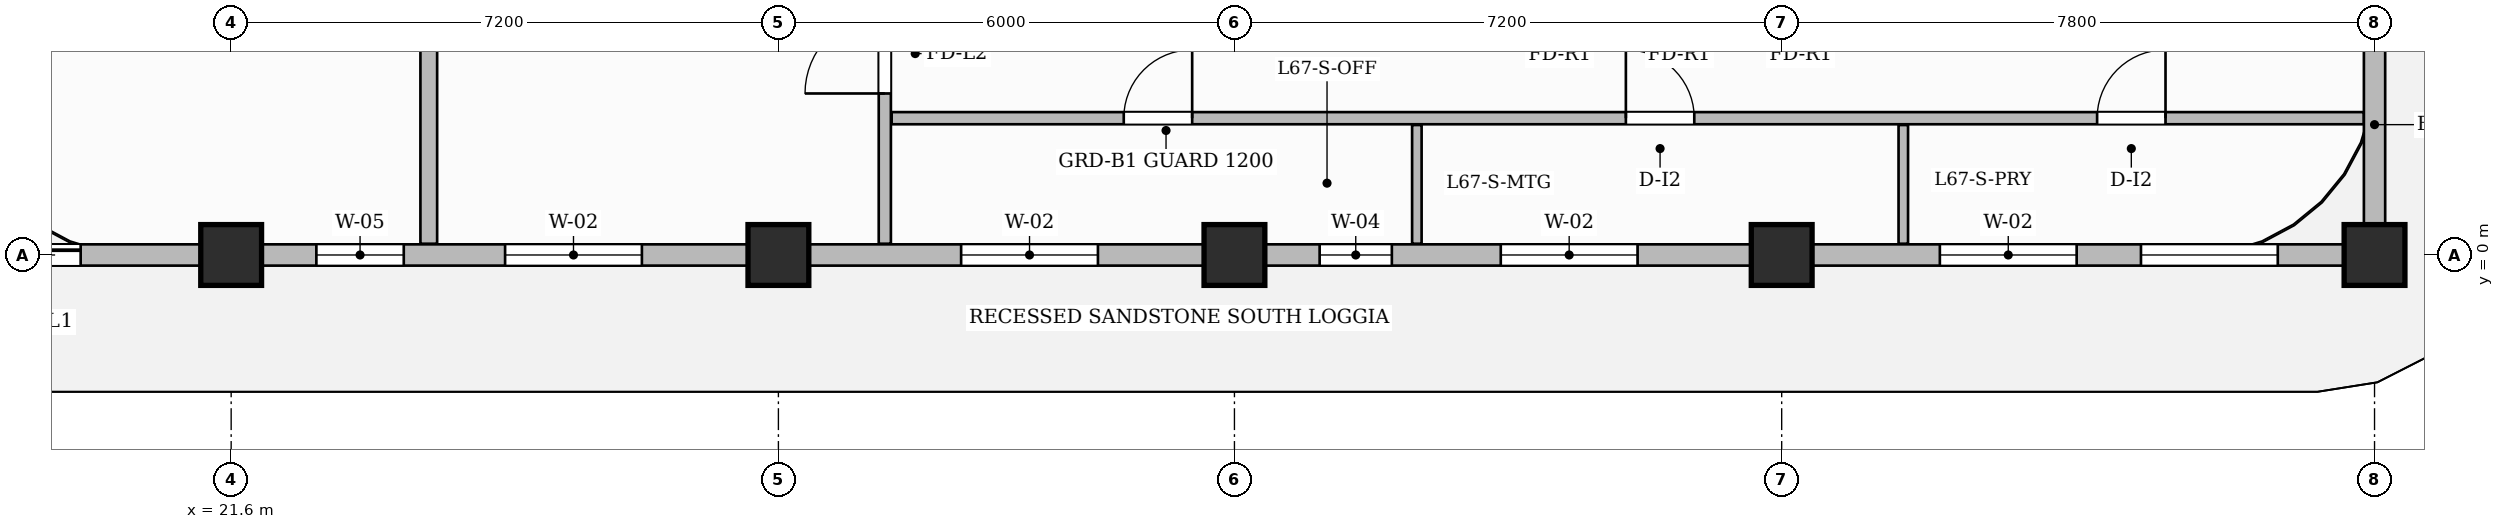
"""IFC4 building model, lengths in metres.
Left out: names, types, materials, properties, quantities, classifications, styles, units other than length and angle.
Written with IfcOpenShell. Run it as: python <this file> out.ifc"""

import sys

from ifc_helpers import new_model, si_unit, direction, frame, frame_2d, origin, origin_2d, place, context, subcontext, project, spatial, rectangle, extrude, source, transform, mapped, element, fill, save


model = new_model("IFC4")
c1 = context("Model", 3, precision=1e-05, world=origin(), true_north=direction((0.0, 1.0)))
c2 = subcontext(c1, "Body", "Model", "MODEL_VIEW")
j1 = project(units=[si_unit("LENGTHUNIT", "METRE"), si_unit("PLANEANGLEUNIT", "RADIAN")], contexts=[c1])
p1 = place(None, origin())
s1 = spatial("IfcSite", under=j1, at=p1, CompositionType="ELEMENT")
p2 = place(p1, origin())
s2 = spatial("IfcBuilding", under=s1, at=p2, CompositionType="ELEMENT")
p3 = place(p2, frame((0.0, 0.0, 267.35)))
s3 = spatial("IfcBuildingStorey", under=s2, at=p3, CompositionType="ELEMENT", Elevation=267.35)
m1 = source(origin(), c2, "Body", "SweptSolid", [
    extrude(rectangle(XDim=0.8, YDim=0.8, at=origin_2d()), origin(), (0.0, 0.0, 1.0), 3.85),
])
for number, where, z_axis, x_axis in (
    (1, (21.6, 0.0, 0.0), (0.0, 0.0, 1.0), (1.0, 0.0, 0.0)),
    (2, (28.8, 0.0, 0.0), (0.0, 0.0, 1.0), (1.0, 0.0, 0.0)),
    (3, (34.8, 0.0, 0.0), (0.0, 0.0, 1.0), (1.0, 0.0, 0.0)),
    (4, (42.0, 0.0, 0.0), (0.0, 0.0, 1.0), (1.0, 0.0, 0.0)),
    (5, (49.8, 0.0, 0.0), (0.0, 0.0, 1.0), (1.0, 0.0, 0.0)),
):
    element("IfcColumn", number, at=place(p3, frame(where, z_axis=z_axis, x_axis=x_axis)), inside=s3, PredefinedType="COLUMN", context=c2, shape_type="MappedRepresentation", body=[
        mapped(m1, transform((0.0, 0.0, 0.0), scale=1.0)),
    ])
p4 = place(p3, frame((30.2, 0.148, 0.0), z_axis=(0.0, 0.0, 1.0), x_axis=(0.0, 1.0, 0.0)))
e6 = element("IfcWall", 6, at=p4, inside=s3, PredefinedType="PARTITIONING", context=c2, shape_type="SweptSolid", body=[
    extrude(rectangle(XDim=9.112, YDim=0.16, at=frame_2d((4.556, 0.0))), origin(), (0.0, 0.0, 1.0), 3.6),
])
p5 = place(p4, frame((1.977, 0.0, 0.0)))
e7 = element("IfcOpeningElement", 7, at=p5, cuts=e6, PredefinedType="OPENING", context=c2, shape_type="SweptSolid", body=[
    extrude(rectangle(XDim=1.05, YDim=2.15, at=frame_2d((0.525, 1.075))), frame((0.0, 0.09, 0.0), z_axis=(0.0, -1.0, 0.0), x_axis=(1.0, 0.0, 0.0)), (0.0, 0.0, 1.0), 0.18),
])
p6 = place(p3, frame((30.29, 1.8, 0.0), z_axis=(0.0, 0.0, 1.0), x_axis=(1.0, 0.0, 0.0)))
e8 = element("IfcWall", 8, at=p6, inside=s3, PredefinedType="PARTITIONING", context=c2, shape_type="SweptSolid", body=[
    extrude(rectangle(XDim=19.37, YDim=0.16, at=frame_2d((9.685, 0.0))), origin(), (0.0, 0.0, 1.0), 3.6),
])
p7 = place(p6, frame((3.054, 0.0, 0.0)))
e9 = element("IfcOpeningElement", 9, at=p7, cuts=e8, PredefinedType="OPENING", context=c2, shape_type="SweptSolid", body=[
    extrude(rectangle(XDim=0.9, YDim=2.15, at=frame_2d((0.45, 1.075))), frame((0.0, 0.09, 0.0), z_axis=(0.0, -1.0, 0.0), x_axis=(1.0, 0.0, 0.0)), (0.0, 0.0, 1.0), 0.18),
])
p8 = place(p6, frame((9.66, 0.0, 0.0)))
e10 = element("IfcOpeningElement", 10, at=p8, cuts=e8, PredefinedType="OPENING", context=c2, shape_type="SweptSolid", body=[
    extrude(rectangle(XDim=0.9, YDim=2.15, at=frame_2d((0.45, 1.075))), frame((0.0, 0.09, 0.0), z_axis=(0.0, -1.0, 0.0), x_axis=(1.0, 0.0, 0.0)), (0.0, 0.0, 1.0), 0.18),
])
p9 = place(p6, frame((15.86, 0.0, 0.0)))
e11 = element("IfcOpeningElement", 11, at=p9, cuts=e8, PredefinedType="OPENING", context=c2, shape_type="SweptSolid", body=[
    extrude(rectangle(XDim=0.9, YDim=2.15, at=frame_2d((0.45, 1.075))), frame((0.0, 0.09, 0.0), z_axis=(0.0, -1.0, 0.0), x_axis=(1.0, 0.0, 0.0)), (0.0, 0.0, 1.0), 0.18),
])
for number, where, z_axis, x_axis in (
    (12, (37.2, 0.148, 0.0), (0.0, 0.0, 1.0), (0.0, 1.0, 0.0)),
    (13, (43.6, 0.148, 0.0), (0.0, 0.0, 1.0), (0.0, 1.0, 0.0)),
):
    element("IfcWall", number, at=place(p3, frame(where, z_axis=z_axis, x_axis=x_axis)), inside=s3, PredefinedType="PARTITIONING", context=c2, shape_type="SweptSolid", body=[
        extrude(rectangle(XDim=1.562, YDim=0.125, at=frame_2d((0.781, 0.0))), origin(), (0.0, 0.0, 1.0), 3.6),
    ])
p10 = place(p3, frame((24.2, 0.148, 0.0), z_axis=(0.0, 0.0, 1.0), x_axis=(0.0, 1.0, 0.0)))
e14 = element("IfcWall", 14, at=p10, inside=s3, PredefinedType="PARTITIONING", context=c2, shape_type="SweptSolid", body=[
    extrude(rectangle(XDim=9.112, YDim=0.22, at=frame_2d((4.556, 0.0))), origin(), (0.0, 0.0, 1.0), 3.6),
])
p11 = place(p3, frame((18.0, 0.0, 0.0), z_axis=(0.0, 0.0, 1.0), x_axis=(1.0, 0.0, 0.0)))
e15 = element("IfcWall", 15, at=p11, inside=s3, PredefinedType="SOLIDWALL", context=c2, shape_type="SweptSolid", body=[
    extrude(rectangle(XDim=31.8, YDim=0.28, at=frame_2d((15.9, 0.0))), origin(), (0.0, 0.0, 1.0), 3.185),
])
p12 = place(p11, frame((0.42, 0.0, 0.0)))
e16 = element("IfcOpeningElement", 16, at=p12, cuts=e15, PredefinedType="OPENING", context=c2, shape_type="SweptSolid", body=[
    extrude(rectangle(XDim=1.2, YDim=2.2, at=frame_2d((0.6, 1.1))), frame((0.0, 0.15, 0.0), z_axis=(0.0, -1.0, 0.0), x_axis=(1.0, 0.0, 0.0)), (0.0, 0.0, 1.0), 0.3),
])
p13 = place(p11, frame((4.721, 0.0, 0.8)))
e17 = element("IfcOpeningElement", 17, at=p13, cuts=e15, PredefinedType="OPENING", context=c2, shape_type="SweptSolid", body=[
    extrude(rectangle(XDim=1.15, YDim=1.8, at=frame_2d((0.575, 0.9))), frame((0.0, 0.15, 0.0), z_axis=(0.0, -1.0, 0.0), x_axis=(1.0, 0.0, 0.0)), (0.0, 0.0, 1.0), 0.3),
])
p14 = place(p11, frame((7.204, 0.0, 0.8)))
e18 = element("IfcOpeningElement", 18, at=p14, cuts=e15, PredefinedType="OPENING", context=c2, shape_type="SweptSolid", body=[
    extrude(rectangle(XDim=1.8, YDim=1.85, at=frame_2d((0.9, 0.925))), frame((0.0, 0.15, 0.0), z_axis=(0.0, -1.0, 0.0), x_axis=(1.0, 0.0, 0.0)), (0.0, 0.0, 1.0), 0.3),
])
p15 = place(p11, frame((13.204, 0.0, 0.8)))
e19 = element("IfcOpeningElement", 19, at=p15, cuts=e15, PredefinedType="OPENING", context=c2, shape_type="SweptSolid", body=[
    extrude(rectangle(XDim=1.8, YDim=1.85, at=frame_2d((0.9, 0.925))), frame((0.0, 0.15, 0.0), z_axis=(0.0, -1.0, 0.0), x_axis=(1.0, 0.0, 0.0)), (0.0, 0.0, 1.0), 0.3),
])
p16 = place(p11, frame((17.921, 0.0, 0.8)))
e20 = element("IfcOpeningElement", 20, at=p16, cuts=e15, PredefinedType="OPENING", context=c2, shape_type="SweptSolid", body=[
    extrude(rectangle(XDim=0.95, YDim=1.75, at=frame_2d((0.475, 0.875))), frame((0.0, 0.15, 0.0), z_axis=(0.0, -1.0, 0.0), x_axis=(1.0, 0.0, 0.0)), (0.0, 0.0, 1.0), 0.3),
])
p17 = place(p11, frame((20.304, 0.0, 0.8)))
e21 = element("IfcOpeningElement", 21, at=p17, cuts=e15, PredefinedType="OPENING", context=c2, shape_type="SweptSolid", body=[
    extrude(rectangle(XDim=1.8, YDim=1.85, at=frame_2d((0.9, 0.925))), frame((0.0, 0.15, 0.0), z_axis=(0.0, -1.0, 0.0), x_axis=(1.0, 0.0, 0.0)), (0.0, 0.0, 1.0), 0.3),
])
p18 = place(p11, frame((26.081, 0.0, 0.8)))
e22 = element("IfcOpeningElement", 22, at=p18, cuts=e15, PredefinedType="OPENING", context=c2, shape_type="SweptSolid", body=[
    extrude(rectangle(XDim=1.8, YDim=1.85, at=frame_2d((0.9, 0.925))), frame((0.0, 0.15, 0.0), z_axis=(0.0, -1.0, 0.0), x_axis=(1.0, 0.0, 0.0)), (0.0, 0.0, 1.0), 0.3),
])
p19 = place(p11, frame((28.727, 0.0, 0.8)))
e23 = element("IfcOpeningElement", 23, at=p19, cuts=e15, PredefinedType="OPENING", context=c2, shape_type="SweptSolid", body=[
    extrude(rectangle(XDim=1.8, YDim=1.85, at=frame_2d((0.9, 0.925))), frame((0.0, 0.15, 0.0), z_axis=(0.0, -1.0, 0.0), x_axis=(1.0, 0.0, 0.0)), (0.0, 0.0, 1.0), 0.3),
])
p20 = place(p3, frame((49.8, 0.05, 0.0), z_axis=(0.0, 0.0, 1.0), x_axis=(0.0, 1.0, 0.0)))
e24 = element("IfcWall", 24, at=p20, inside=s3, PredefinedType="SOLIDWALL", context=c2, shape_type="SweptSolid", body=[
    extrude(rectangle(XDim=3.33, YDim=0.28, at=frame_2d((1.665, 0.0))), origin(), (0.0, 0.0, 1.0), 3.6),
])
m2 = source(origin(), c2, "Body", "SweptSolid", [
    extrude(rectangle(XDim=1.05, YDim=2.15, at=frame_2d((0.525, 1.075))), frame((0.0, 0.025, 0.0), z_axis=(0.0, -1.0, 0.0), x_axis=(1.0, 0.0, 0.0)), (0.0, 0.0, 1.0), 0.05),
])
p21 = place(p5, origin())
e25 = element("IfcDoor", 25, at=p21, inside=s3, OperationType="SINGLE_SWING_LEFT", PredefinedType="DOOR", context=c2, shape_type="MappedRepresentation", body=[
    mapped(m2, transform((0.0, 0.0, 0.0), scale=1.0)),
])
fill(e7, e25)
m3 = source(origin(), c2, "Body", "SweptSolid", [
    extrude(rectangle(XDim=0.9, YDim=2.15, at=frame_2d((0.45, 1.075))), frame((0.0, 0.025, 0.0), z_axis=(0.0, -1.0, 0.0), x_axis=(1.0, 0.0, 0.0)), (0.0, 0.0, 1.0), 0.05),
])
p22 = place(p7, origin())
e26 = element("IfcDoor", 26, at=p22, inside=s3, OperationType="SINGLE_SWING_RIGHT", PredefinedType="DOOR", context=c2, shape_type="MappedRepresentation", body=[
    mapped(m3, transform((0.0, 0.0, 0.0), scale=1.0)),
])
fill(e9, e26)
p23 = place(p8, origin())
e27 = element("IfcDoor", 27, at=p23, inside=s3, OperationType="SINGLE_SWING_LEFT", PredefinedType="DOOR", context=c2, shape_type="MappedRepresentation", body=[
    mapped(m3, transform((0.0, 0.0, 0.0), scale=1.0)),
])
fill(e10, e27)
p24 = place(p9, origin())
e28 = element("IfcDoor", 28, at=p24, inside=s3, OperationType="SINGLE_SWING_RIGHT", PredefinedType="DOOR", context=c2, shape_type="MappedRepresentation", body=[
    mapped(m3, transform((0.0, 0.0, 0.0), scale=1.0)),
])
fill(e11, e28)
m4 = source(origin(), c2, "Body", "SweptSolid", [
    extrude(rectangle(XDim=1.2, YDim=2.2, at=frame_2d((0.6, 1.1))), frame((0.0, 0.025, 0.0), z_axis=(0.0, -1.0, 0.0), x_axis=(1.0, 0.0, 0.0)), (0.0, 0.0, 1.0), 0.05),
])
p25 = place(p12, origin())
e29 = element("IfcDoor", 29, at=p25, inside=s3, OperationType="SLIDING_TO_LEFT", PredefinedType="DOOR", context=c2, shape_type="MappedRepresentation", body=[
    mapped(m4, transform((0.0, 0.0, 0.0), scale=1.0)),
])
fill(e16, e29)
m5 = source(origin(), c2, "Body", "SweptSolid", [
    extrude(rectangle(XDim=1.15, YDim=1.8, at=frame_2d((0.575, 0.9))), frame((0.0, 0.03, 0.0), z_axis=(0.0, -1.0, 0.0), x_axis=(1.0, 0.0, 0.0)), (0.0, 0.0, 1.0), 0.06),
])
p26 = place(p13, origin())
e30 = element("IfcWindow", 30, at=p26, inside=s3, PartitioningType="SINGLE_PANEL", PredefinedType="WINDOW", context=c2, shape_type="MappedRepresentation", body=[
    mapped(m5, transform((0.0, 0.0, 0.0), scale=1.0)),
])
fill(e17, e30)
m6 = source(origin(), c2, "Body", "SweptSolid", [
    extrude(rectangle(XDim=1.8, YDim=1.85, at=frame_2d((0.9, 0.925))), frame((0.0, 0.03, 0.0), z_axis=(0.0, -1.0, 0.0), x_axis=(1.0, 0.0, 0.0)), (0.0, 0.0, 1.0), 0.06),
])
p27 = place(p14, origin())
e31 = element("IfcWindow", 31, at=p27, inside=s3, PartitioningType="DOUBLE_PANEL_VERTICAL", PredefinedType="WINDOW", context=c2, shape_type="MappedRepresentation", body=[
    mapped(m6, transform((0.0, 0.0, 0.0), scale=1.0)),
])
fill(e18, e31)
p28 = place(p15, origin())
e32 = element("IfcWindow", 32, at=p28, inside=s3, PartitioningType="DOUBLE_PANEL_VERTICAL", PredefinedType="WINDOW", context=c2, shape_type="MappedRepresentation", body=[
    mapped(m6, transform((0.0, 0.0, 0.0), scale=1.0)),
])
fill(e19, e32)
m7 = source(origin(), c2, "Body", "SweptSolid", [
    extrude(rectangle(XDim=0.95, YDim=1.75, at=frame_2d((0.475, 0.875))), frame((0.0, 0.03, 0.0), z_axis=(0.0, -1.0, 0.0), x_axis=(1.0, 0.0, 0.0)), (0.0, 0.0, 1.0), 0.06),
])
p29 = place(p16, origin())
e33 = element("IfcWindow", 33, at=p29, inside=s3, PartitioningType="SINGLE_PANEL", PredefinedType="WINDOW", context=c2, shape_type="MappedRepresentation", body=[
    mapped(m7, transform((0.0, 0.0, 0.0), scale=1.0)),
])
fill(e20, e33)
p30 = place(p17, origin())
e34 = element("IfcWindow", 34, at=p30, inside=s3, PartitioningType="DOUBLE_PANEL_VERTICAL", PredefinedType="WINDOW", context=c2, shape_type="MappedRepresentation", body=[
    mapped(m6, transform((0.0, 0.0, 0.0), scale=1.0)),
])
fill(e21, e34)
p31 = place(p18, origin())
e35 = element("IfcWindow", 35, at=p31, inside=s3, PartitioningType="DOUBLE_PANEL_VERTICAL", PredefinedType="WINDOW", context=c2, shape_type="MappedRepresentation", body=[
    mapped(m6, transform((0.0, 0.0, 0.0), scale=1.0)),
])
fill(e22, e35)
p32 = place(p19, origin())
e36 = element("IfcWindow", 36, at=p32, inside=s3, PartitioningType="DOUBLE_PANEL_VERTICAL", PredefinedType="WINDOW", context=c2, shape_type="MappedRepresentation", body=[
    mapped(m6, transform((0.0, 0.0, 0.0), scale=1.0)),
])
fill(e23, e36)
save(model, sys.argv[1])
